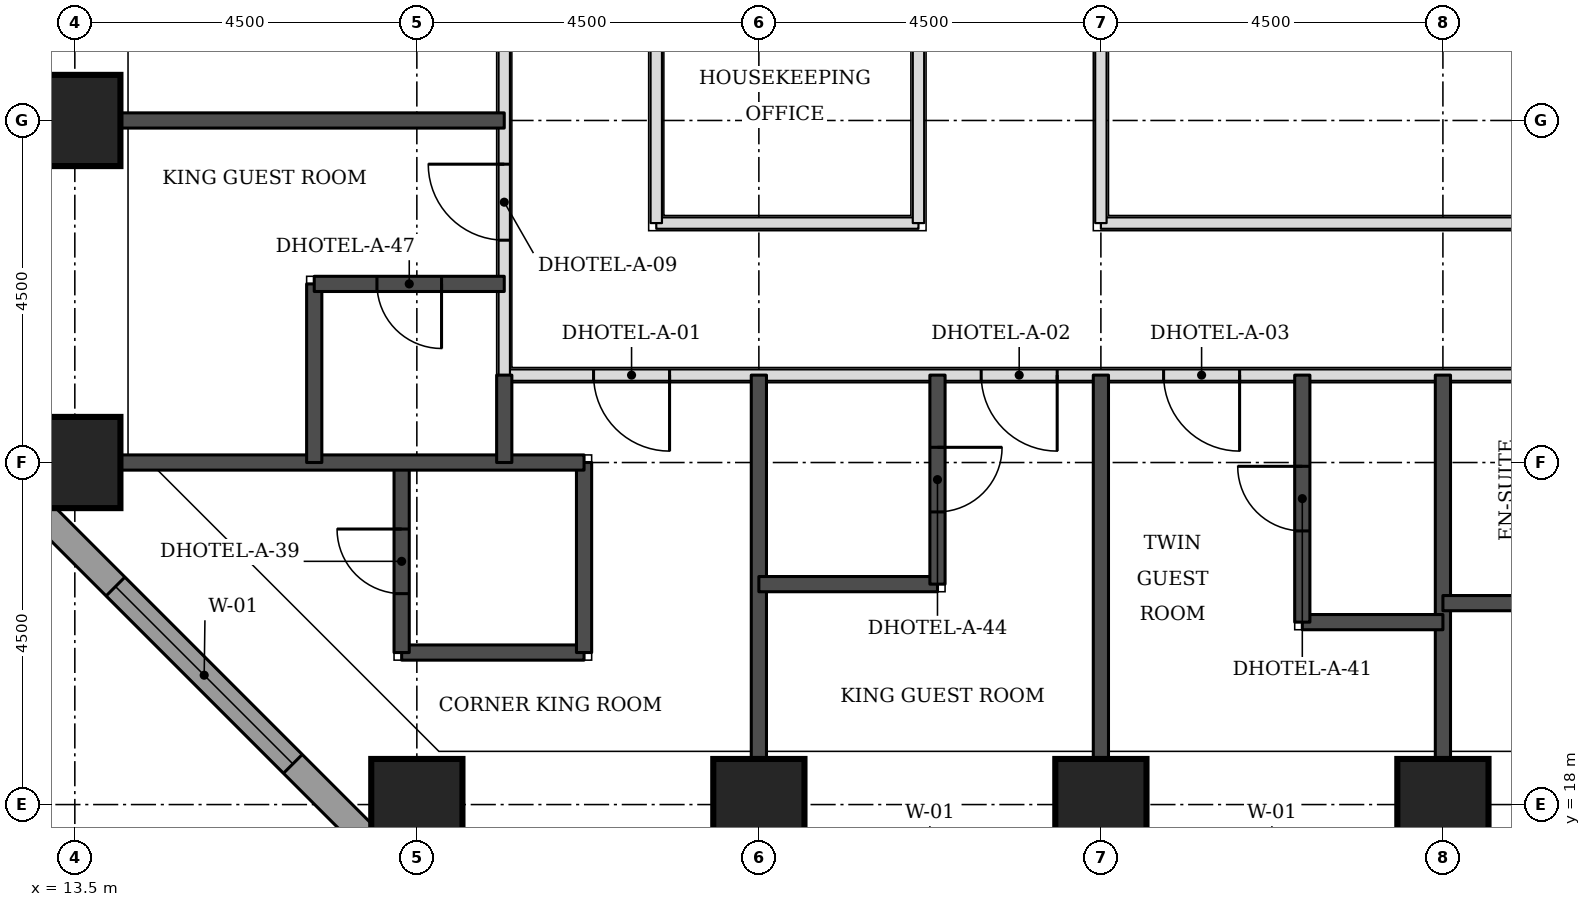
"""IFC4 building model, lengths in metres.
Left out: names, types, materials, properties, quantities, classifications, styles, units other than length and angle.
Written with IfcOpenShell. Run it as: python <this file> out.ifc"""

import sys

from ifc_helpers import new_model, si_unit, direction, frame, frame_2d, origin, origin_2d, place, context, subcontext, project, spatial, rectangle, extrude, element, fill, save


model = new_model("IFC4")
c1 = context("Model", 3, precision=1e-05, world=origin(), true_north=direction((0.0, 1.0)))
c2 = subcontext(c1, "Body", "Model", "MODEL_VIEW")
j1 = project(units=[si_unit("LENGTHUNIT", "METRE"), si_unit("PLANEANGLEUNIT", "RADIAN")], contexts=[c1])
p1 = place(None, origin())
s1 = spatial("IfcSite", under=j1, at=p1, CompositionType="ELEMENT")
p2 = place(p1, origin())
s2 = spatial("IfcBuilding", under=s1, at=p2, CompositionType="ELEMENT")
p3 = place(p2, frame((0.0, 0.0, 26.4)))
s3 = spatial("IfcBuildingStorey", under=s2, at=p3, CompositionType="ELEMENT", Elevation=26.4)
for number, where, z_axis, x_axis in (
    (1, (18.0, 18.0, 0.0), (0.0, 0.0, 1.0), (1.0, 0.0, 0.0)),
    (2, (22.5, 18.0, 0.0), (0.0, 0.0, 1.0), (1.0, 0.0, 0.0)),
    (3, (27.0, 18.0, 0.0), (0.0, 0.0, 1.0), (1.0, 0.0, 0.0)),
    (4, (31.5, 18.0, 0.0), (0.0, 0.0, 1.0), (1.0, 0.0, 0.0)),
    (5, (13.5, 22.5, 0.0), (0.0, 0.0, 1.0), (1.0, 0.0, 0.0)),
    (6, (13.5, 27.0, 0.0), (0.0, 0.0, 1.0), (1.0, 0.0, 0.0)),
):
    element("IfcColumn", number, at=place(p3, frame(where, z_axis=z_axis, x_axis=x_axis)), inside=s3, PredefinedType="COLUMN", context=c2, shape_type="SweptSolid", body=[
        extrude(rectangle(XDim=1.2, YDim=1.2, at=origin_2d()), origin(), (0.0, 0.0, 1.0), 3.3),
    ])
p4 = place(p3, frame((12.674, 22.23, 0.0), z_axis=(0.0, 0.0, 1.0), x_axis=(0.707106781187, -0.707106781187, 0.0)))
e7 = element("IfcWall", 7, at=p4, inside=s3, PredefinedType="STANDARD", context=c2, shape_type="SweptSolid", body=[
    extrude(rectangle(XDim=7.151, YDim=0.35, at=frame_2d((3.576, 0.0))), origin(), (0.0, 0.0, 1.0), 3.055),
])
p5 = place(p4, frame((1.926, 0.0, 0.8)))
e8 = element("IfcOpeningElement", 8, at=p5, cuts=e7, PredefinedType="OPENING", context=c2, shape_type="SweptSolid", body=[
    extrude(rectangle(XDim=3.3, YDim=1.5, at=frame_2d((1.65, 0.75))), frame((0.0, 0.185, 0.0), z_axis=(0.0, -1.0, 0.0), x_axis=(1.0, 0.0, 0.0)), (0.0, 0.0, 1.0), 0.37),
])
p6 = place(p3, frame((19.15, 23.65, 0.0), z_axis=(0.0, 0.0, 1.0), x_axis=(1.0, 0.0, 0.0)))
e9 = element("IfcWall", 9, at=p6, inside=s3, PredefinedType="PARTITIONING", context=c2, shape_type="SweptSolid", body=[
    extrude(rectangle(XDim=32.35, YDim=0.15, at=frame_2d((16.175, 0.0))), origin(), (0.0, 0.0, 1.0), 3.08),
])
p7 = place(p6, frame((6.275, 0.0, 0.0)))
e10 = element("IfcOpeningElement", 10, at=p7, cuts=e9, PredefinedType="OPENING", context=c2, shape_type="SweptSolid", body=[
    extrude(rectangle(XDim=1.0, YDim=2.1, at=frame_2d((0.5, 1.05))), frame((0.0, 0.085, 0.0), z_axis=(0.0, -1.0, 0.0), x_axis=(1.0, 0.0, 0.0)), (0.0, 0.0, 1.0), 0.17),
])
p8 = place(p6, frame((8.675, 0.0, 0.0)))
e11 = element("IfcOpeningElement", 11, at=p8, cuts=e9, PredefinedType="OPENING", context=c2, shape_type="SweptSolid", body=[
    extrude(rectangle(XDim=1.0, YDim=2.1, at=frame_2d((0.5, 1.05))), frame((0.0, 0.085, 0.0), z_axis=(0.0, -1.0, 0.0), x_axis=(1.0, 0.0, 0.0)), (0.0, 0.0, 1.0), 0.17),
])
p9 = place(p6, frame((15.25, 0.0, 0.0)))
e12 = element("IfcOpeningElement", 12, at=p9, cuts=e9, PredefinedType="OPENING", context=c2, shape_type="SweptSolid", body=[
    extrude(rectangle(XDim=1.0, YDim=2.1, at=frame_2d((0.5, 1.05))), frame((0.0, 0.085, 0.0), z_axis=(0.0, -1.0, 0.0), x_axis=(1.0, 0.0, 0.0)), (0.0, 0.0, 1.0), 0.17),
])
p10 = place(p6, frame((17.675, 0.0, 0.0)))
e13 = element("IfcOpeningElement", 13, at=p10, cuts=e9, PredefinedType="OPENING", context=c2, shape_type="SweptSolid", body=[
    extrude(rectangle(XDim=1.0, YDim=2.1, at=frame_2d((0.5, 1.05))), frame((0.0, 0.085, 0.0), z_axis=(0.0, -1.0, 0.0), x_axis=(1.0, 0.0, 0.0)), (0.0, 0.0, 1.0), 0.17),
])
p11 = place(p6, frame((24.275, 0.0, 0.0)))
e14 = element("IfcOpeningElement", 14, at=p11, cuts=e9, PredefinedType="OPENING", context=c2, shape_type="SweptSolid", body=[
    extrude(rectangle(XDim=1.0, YDim=2.1, at=frame_2d((0.5, 1.05))), frame((0.0, 0.085, 0.0), z_axis=(0.0, -1.0, 0.0), x_axis=(1.0, 0.0, 0.0)), (0.0, 0.0, 1.0), 0.17),
])
p12 = place(p6, frame((26.675, 0.0, 0.0)))
e15 = element("IfcOpeningElement", 15, at=p12, cuts=e9, PredefinedType="OPENING", context=c2, shape_type="SweptSolid", body=[
    extrude(rectangle(XDim=1.0, YDim=2.1, at=frame_2d((0.5, 1.05))), frame((0.0, 0.085, 0.0), z_axis=(0.0, -1.0, 0.0), x_axis=(1.0, 0.0, 0.0)), (0.0, 0.0, 1.0), 0.17),
])
p13 = place(p6, frame((1.175, 0.0, 0.0)))
e16 = element("IfcOpeningElement", 16, at=p13, cuts=e9, PredefinedType="OPENING", context=c2, shape_type="SweptSolid", body=[
    extrude(rectangle(XDim=1.0, YDim=2.1, at=frame_2d((0.5, 1.05))), frame((0.0, 0.085, 0.0), z_axis=(0.0, -1.0, 0.0), x_axis=(1.0, 0.0, 0.0)), (0.0, 0.0, 1.0), 0.17),
])
p14 = place(p6, frame((30.85, 0.0, 0.0)))
e17 = element("IfcOpeningElement", 17, at=p14, cuts=e9, PredefinedType="OPENING", context=c2, shape_type="SweptSolid", body=[
    extrude(rectangle(XDim=1.0, YDim=2.1, at=frame_2d((0.5, 1.05))), frame((0.0, 0.085, 0.0), z_axis=(0.0, -1.0, 0.0), x_axis=(1.0, 0.0, 0.0)), (0.0, 0.0, 1.0), 0.17),
])
p15 = place(p3, frame((19.15, 23.65, 0.0), z_axis=(0.0, 0.0, 1.0), x_axis=(0.0, 1.0, 0.0)))
e18 = element("IfcWall", 18, at=p15, inside=s3, PredefinedType="PARTITIONING", context=c2, shape_type="SweptSolid", body=[
    extrude(rectangle(XDim=25.85, YDim=0.15, at=frame_2d((12.925, 0.0))), origin(), (0.0, 0.0, 1.0), 3.08),
])
p16 = place(p15, frame((1.775, 0.0, 0.0)))
e19 = element("IfcOpeningElement", 19, at=p16, cuts=e18, PredefinedType="OPENING", context=c2, shape_type="SweptSolid", body=[
    extrude(rectangle(XDim=1.0, YDim=2.1, at=frame_2d((0.5, 1.05))), frame((0.0, 0.085, 0.0), z_axis=(0.0, -1.0, 0.0), x_axis=(1.0, 0.0, 0.0)), (0.0, 0.0, 1.0), 0.17),
])
p17 = place(p15, frame((6.125, 0.0, 0.0)))
e20 = element("IfcOpeningElement", 20, at=p17, cuts=e18, PredefinedType="OPENING", context=c2, shape_type="SweptSolid", body=[
    extrude(rectangle(XDim=1.0, YDim=2.1, at=frame_2d((0.5, 1.05))), frame((0.0, 0.085, 0.0), z_axis=(0.0, -1.0, 0.0), x_axis=(1.0, 0.0, 0.0)), (0.0, 0.0, 1.0), 0.17),
])
p18 = place(p15, frame((17.825, 0.0, 0.0)))
e21 = element("IfcOpeningElement", 21, at=p18, cuts=e18, PredefinedType="OPENING", context=c2, shape_type="SweptSolid", body=[
    extrude(rectangle(XDim=1.0, YDim=2.1, at=frame_2d((0.5, 1.05))), frame((0.0, 0.085, 0.0), z_axis=(0.0, -1.0, 0.0), x_axis=(1.0, 0.0, 0.0)), (0.0, 0.0, 1.0), 0.17),
])
p19 = place(p15, frame((23.04, 0.0, 0.0)))
e22 = element("IfcOpeningElement", 22, at=p19, cuts=e18, PredefinedType="OPENING", context=c2, shape_type="SweptSolid", body=[
    extrude(rectangle(XDim=0.9, YDim=2.1, at=frame_2d((0.45, 1.05))), frame((0.0, 0.085, 0.0), z_axis=(0.0, -1.0, 0.0), x_axis=(1.0, 0.0, 0.0)), (0.0, 0.0, 1.0), 0.17),
])
p20 = place(p3, frame((21.15, 25.65, 0.0), z_axis=(0.0, 0.0, 1.0), x_axis=(1.0, 0.0, 0.0)))
e23 = element("IfcWall", 23, at=p20, inside=s3, PredefinedType="PARTITIONING", context=c2, shape_type="SweptSolid", body=[
    extrude(rectangle(XDim=3.45, YDim=0.15, at=frame_2d((1.725, 0.0))), origin(), (0.0, 0.0, 1.0), 3.08),
])
p21 = place(p3, frame((21.15, 25.65, 0.0), z_axis=(0.0, 0.0, 1.0), x_axis=(0.0, 1.0, 0.0)))
e24 = element("IfcWall", 24, at=p21, inside=s3, PredefinedType="PARTITIONING", context=c2, shape_type="SweptSolid", body=[
    extrude(rectangle(XDim=17.35, YDim=0.15, at=frame_2d((8.675, 0.0))), origin(), (0.0, 0.0, 1.0), 3.08),
])
p22 = place(p21, frame((3.3, 0.0, 0.0)))
e25 = element("IfcOpeningElement", 25, at=p22, cuts=e24, PredefinedType="OPENING", context=c2, shape_type="SweptSolid", body=[
    extrude(rectangle(XDim=0.9, YDim=2.1, at=frame_2d((0.45, 1.05))), frame((0.0, 0.085, 0.0), z_axis=(0.0, -1.0, 0.0), x_axis=(1.0, 0.0, 0.0)), (0.0, 0.0, 1.0), 0.17),
])
p23 = place(p21, frame((10.725, 0.0, 0.0)))
e26 = element("IfcOpeningElement", 26, at=p23, cuts=e24, PredefinedType="OPENING", context=c2, shape_type="SweptSolid", body=[
    extrude(rectangle(XDim=0.9, YDim=2.1, at=frame_2d((0.45, 1.05))), frame((0.0, 0.085, 0.0), z_axis=(0.0, -1.0, 0.0), x_axis=(1.0, 0.0, 0.0)), (0.0, 0.0, 1.0), 0.17),
])
p24 = place(p3, frame((24.6, 25.65, 0.0), z_axis=(0.0, 0.0, 1.0), x_axis=(0.0, 1.0, 0.0)))
e27 = element("IfcWall", 27, at=p24, inside=s3, PredefinedType="PARTITIONING", context=c2, shape_type="SweptSolid", body=[
    extrude(rectangle(XDim=14.85, YDim=0.15, at=frame_2d((7.425, 0.0))), origin(), (0.0, 0.0, 1.0), 3.08),
])
p25 = place(p3, frame((27.0, 25.65, 0.0), z_axis=(0.0, 0.0, 1.0), x_axis=(1.0, 0.0, 0.0)))
e28 = element("IfcWall", 28, at=p25, inside=s3, PredefinedType="PARTITIONING", context=c2, shape_type="SweptSolid", body=[
    extrude(rectangle(XDim=11.5, YDim=0.15, at=frame_2d((5.75, 0.0))), origin(), (0.0, 0.0, 1.0), 3.08),
])
p26 = place(p3, frame((27.0, 25.65, 0.0), z_axis=(0.0, 0.0, 1.0), x_axis=(0.0, 1.0, 0.0)))
e29 = element("IfcWall", 29, at=p26, inside=s3, PredefinedType="PARTITIONING", context=c2, shape_type="SweptSolid", body=[
    extrude(rectangle(XDim=3.85, YDim=0.15, at=frame_2d((1.925, 0.0))), origin(), (0.0, 0.0, 1.0), 3.08),
])
for number, where, z_axis, x_axis in (
    (30, (22.5, 18.6, 0.0), (0.0, 0.0, 1.0), (0.0, 1.0, 0.0)),
    (31, (27.0, 18.6, 0.0), (0.0, 0.0, 1.0), (0.0, 1.0, 0.0)),
    (32, (31.5, 18.6, 0.0), (0.0, 0.0, 1.0), (0.0, 1.0, 0.0)),
):
    element("IfcWall", number, at=place(p3, frame(where, z_axis=z_axis, x_axis=x_axis)), inside=s3, PredefinedType="SOLIDWALL", context=c2, shape_type="SweptSolid", body=[
        extrude(rectangle(XDim=5.05, YDim=0.2, at=frame_2d((2.525, 0.0))), origin(), (0.0, 0.0, 1.0), 3.08),
    ])
p27 = place(p3, frame((17.8, 20.0, 0.0), z_axis=(0.0, 0.0, 1.0), x_axis=(1.0, 0.0, 0.0)))
e33 = element("IfcWall", 33, at=p27, inside=s3, PredefinedType="SOLIDWALL", context=c2, shape_type="SweptSolid", body=[
    extrude(rectangle(XDim=2.4, YDim=0.2, at=frame_2d((1.2, 0.0))), origin(), (0.0, 0.0, 1.0), 3.08),
])
p28 = place(p3, frame((17.8, 20.0, 0.0), z_axis=(0.0, 0.0, 1.0), x_axis=(0.0, 1.0, 0.0)))
e34 = element("IfcWall", 34, at=p28, inside=s3, PredefinedType="SOLIDWALL", context=c2, shape_type="SweptSolid", body=[
    extrude(rectangle(XDim=2.5, YDim=0.2, at=frame_2d((1.25, 0.0))), origin(), (0.0, 0.0, 1.0), 3.08),
])
p29 = place(p28, frame((0.775, 0.0, 0.0)))
e35 = element("IfcOpeningElement", 35, at=p29, cuts=e34, PredefinedType="OPENING", context=c2, shape_type="SweptSolid", body=[
    extrude(rectangle(XDim=0.85, YDim=2.1, at=frame_2d((0.425, 1.05))), frame((0.0, 0.11, 0.0), z_axis=(0.0, -1.0, 0.0), x_axis=(1.0, 0.0, 0.0)), (0.0, 0.0, 1.0), 0.22),
])
p30 = place(p3, frame((20.2, 20.0, 0.0), z_axis=(0.0, 0.0, 1.0), x_axis=(0.0, 1.0, 0.0)))
e36 = element("IfcWall", 36, at=p30, inside=s3, PredefinedType="SOLIDWALL", context=c2, shape_type="SweptSolid", body=[
    extrude(rectangle(XDim=2.5, YDim=0.2, at=frame_2d((1.25, 0.0))), origin(), (0.0, 0.0, 1.0), 3.08),
])
p31 = place(p3, frame((29.65, 20.4, 0.0), z_axis=(0.0, 0.0, 1.0), x_axis=(1.0, 0.0, 0.0)))
e37 = element("IfcWall", 37, at=p31, inside=s3, PredefinedType="SOLIDWALL", context=c2, shape_type="SweptSolid", body=[
    extrude(rectangle(XDim=1.85, YDim=0.2, at=frame_2d((0.925, 0.0))), origin(), (0.0, 0.0, 1.0), 3.08),
])
p32 = place(p3, frame((29.65, 20.4, 0.0), z_axis=(0.0, 0.0, 1.0), x_axis=(0.0, 1.0, 0.0)))
e38 = element("IfcWall", 38, at=p32, inside=s3, PredefinedType="SOLIDWALL", context=c2, shape_type="SweptSolid", body=[
    extrude(rectangle(XDim=3.25, YDim=0.2, at=frame_2d((1.625, 0.0))), origin(), (0.0, 0.0, 1.0), 3.08),
])
p33 = place(p32, frame((1.2, 0.0, 0.0)))
e39 = element("IfcOpeningElement", 39, at=p33, cuts=e38, PredefinedType="OPENING", context=c2, shape_type="SweptSolid", body=[
    extrude(rectangle(XDim=0.85, YDim=2.1, at=frame_2d((0.425, 1.05))), frame((0.0, 0.11, 0.0), z_axis=(0.0, -1.0, 0.0), x_axis=(1.0, 0.0, 0.0)), (0.0, 0.0, 1.0), 0.22),
])
for number, where, z_axis, x_axis in (
    (40, (31.5, 20.65, 0.0), (0.0, 0.0, 1.0), (1.0, 0.0, 0.0)),
    (41, (22.5, 20.9, 0.0), (0.0, 0.0, 1.0), (1.0, 0.0, 0.0)),
):
    element("IfcWall", number, at=place(p3, frame(where, z_axis=z_axis, x_axis=x_axis)), inside=s3, PredefinedType="SOLIDWALL", context=c2, shape_type="SweptSolid", body=[
        extrude(rectangle(XDim=2.35, YDim=0.2, at=frame_2d((1.175, 0.0))), origin(), (0.0, 0.0, 1.0), 3.08),
    ])
p34 = place(p3, frame((24.85, 20.9, 0.0), z_axis=(0.0, 0.0, 1.0), x_axis=(0.0, 1.0, 0.0)))
e42 = element("IfcWall", 42, at=p34, inside=s3, PredefinedType="SOLIDWALL", context=c2, shape_type="SweptSolid", body=[
    extrude(rectangle(XDim=2.75, YDim=0.2, at=frame_2d((1.375, 0.0))), origin(), (0.0, 0.0, 1.0), 3.08),
])
p35 = place(p34, frame((0.95, 0.0, 0.0)))
e43 = element("IfcOpeningElement", 43, at=p35, cuts=e42, PredefinedType="OPENING", context=c2, shape_type="SweptSolid", body=[
    extrude(rectangle(XDim=0.85, YDim=2.1, at=frame_2d((0.425, 1.05))), frame((0.0, 0.11, 0.0), z_axis=(0.0, -1.0, 0.0), x_axis=(1.0, 0.0, 0.0)), (0.0, 0.0, 1.0), 0.22),
])
p36 = place(p3, frame((14.1, 22.5, 0.0), z_axis=(0.0, 0.0, 1.0), x_axis=(1.0, 0.0, 0.0)))
e44 = element("IfcWall", 44, at=p36, inside=s3, PredefinedType="SOLIDWALL", context=c2, shape_type="SweptSolid", body=[
    extrude(rectangle(XDim=6.1, YDim=0.2, at=frame_2d((3.05, 0.0))), origin(), (0.0, 0.0, 1.0), 3.08),
])
p37 = place(p3, frame((16.65, 22.5, 0.0), z_axis=(0.0, 0.0, 1.0), x_axis=(0.0, 1.0, 0.0)))
e45 = element("IfcWall", 45, at=p37, inside=s3, PredefinedType="SOLIDWALL", context=c2, shape_type="SweptSolid", body=[
    extrude(rectangle(XDim=2.35, YDim=0.2, at=frame_2d((1.175, 0.0))), origin(), (0.0, 0.0, 1.0), 3.08),
])
p38 = place(p3, frame((19.15, 22.5, 0.0), z_axis=(0.0, 0.0, 1.0), x_axis=(0.0, 1.0, 0.0)))
e46 = element("IfcWall", 46, at=p38, inside=s3, PredefinedType="SOLIDWALL", context=c2, shape_type="SweptSolid", body=[
    extrude(rectangle(XDim=1.15, YDim=0.2, at=frame_2d((0.575, 0.0))), origin(), (0.0, 0.0, 1.0), 3.08),
])
p39 = place(p3, frame((16.65, 24.85, 0.0), z_axis=(0.0, 0.0, 1.0), x_axis=(1.0, 0.0, 0.0)))
e47 = element("IfcWall", 47, at=p39, inside=s3, PredefinedType="SOLIDWALL", context=c2, shape_type="SweptSolid", body=[
    extrude(rectangle(XDim=2.5, YDim=0.2, at=frame_2d((1.25, 0.0))), origin(), (0.0, 0.0, 1.0), 3.08),
])
p40 = place(p39, frame((0.825, 0.0, 0.0)))
e48 = element("IfcOpeningElement", 48, at=p40, cuts=e47, PredefinedType="OPENING", context=c2, shape_type="SweptSolid", body=[
    extrude(rectangle(XDim=0.85, YDim=2.1, at=frame_2d((0.425, 1.05))), frame((0.0, 0.11, 0.0), z_axis=(0.0, -1.0, 0.0), x_axis=(1.0, 0.0, 0.0)), (0.0, 0.0, 1.0), 0.22),
])
p41 = place(p3, frame((14.1, 27.0, 0.0), z_axis=(0.0, 0.0, 1.0), x_axis=(1.0, 0.0, 0.0)))
e49 = element("IfcWall", 49, at=p41, inside=s3, PredefinedType="SOLIDWALL", context=c2, shape_type="SweptSolid", body=[
    extrude(rectangle(XDim=5.05, YDim=0.2, at=frame_2d((2.525, 0.0))), origin(), (0.0, 0.0, 1.0), 3.08),
])
p42 = place(p5, origin())
e50 = element("IfcWindow", 50, at=p42, inside=s3, PartitioningType="SINGLE_PANEL", PredefinedType="WINDOW", context=c2, shape_type="SweptSolid", body=[
    extrude(rectangle(XDim=3.3, YDim=1.5, at=frame_2d((1.65, 0.75))), frame((0.0, 0.085, 0.0), z_axis=(0.0, -1.0, 0.0), x_axis=(1.0, 0.0, 0.0)), (0.0, 0.0, 1.0), 0.06),
])
fill(e8, e50)
p43 = place(p7, frame((1.0, 0.0, 0.0), z_axis=(0.0, 0.0, 1.0), x_axis=(-1.0, 0.0, 0.0)))
e51 = element("IfcDoor", 51, at=p43, inside=s3, OperationType="SINGLE_SWING_LEFT", PredefinedType="DOOR", context=c2, shape_type="SweptSolid", body=[
    extrude(rectangle(XDim=1.0, YDim=2.1, at=frame_2d((0.5, 1.05))), frame((0.0, 0.025, 0.0), z_axis=(0.0, -1.0, 0.0), x_axis=(1.0, 0.0, 0.0)), (0.0, 0.0, 1.0), 0.05),
])
fill(e10, e51)
p44 = place(p35, frame((0.85, 0.0, 0.0), z_axis=(0.0, 0.0, 1.0), x_axis=(-1.0, 0.0, 0.0)))
e52 = element("IfcDoor", 52, at=p44, inside=s3, OperationType="SINGLE_SWING_LEFT", PredefinedType="DOOR", context=c2, shape_type="SweptSolid", body=[
    extrude(rectangle(XDim=0.85, YDim=2.1, at=frame_2d((0.425, 1.05))), frame((0.0, 0.025, 0.0), z_axis=(0.0, -1.0, 0.0), x_axis=(1.0, 0.0, 0.0)), (0.0, 0.0, 1.0), 0.05),
])
fill(e43, e52)
p45 = place(p8, frame((1.0, 0.0, 0.0), z_axis=(0.0, 0.0, 1.0), x_axis=(-1.0, 0.0, 0.0)))
e53 = element("IfcDoor", 53, at=p45, inside=s3, OperationType="SINGLE_SWING_LEFT", PredefinedType="DOOR", context=c2, shape_type="SweptSolid", body=[
    extrude(rectangle(XDim=1.0, YDim=2.1, at=frame_2d((0.5, 1.05))), frame((0.0, 0.025, 0.0), z_axis=(0.0, -1.0, 0.0), x_axis=(1.0, 0.0, 0.0)), (0.0, 0.0, 1.0), 0.05),
])
fill(e11, e53)
p46 = place(p33, origin())
e54 = element("IfcDoor", 54, at=p46, inside=s3, OperationType="SINGLE_SWING_RIGHT", PredefinedType="DOOR", context=c2, shape_type="SweptSolid", body=[
    extrude(rectangle(XDim=0.85, YDim=2.1, at=frame_2d((0.425, 1.05))), frame((0.0, 0.025, 0.0), z_axis=(0.0, -1.0, 0.0), x_axis=(1.0, 0.0, 0.0)), (0.0, 0.0, 1.0), 0.05),
])
fill(e39, e54)
p47 = place(p16, origin())
e55 = element("IfcDoor", 55, at=p47, inside=s3, OperationType="SINGLE_SWING_RIGHT", PredefinedType="DOOR", context=c2, shape_type="SweptSolid", body=[
    extrude(rectangle(XDim=1.0, YDim=2.1, at=frame_2d((0.5, 1.05))), frame((0.0, 0.025, 0.0), z_axis=(0.0, -1.0, 0.0), x_axis=(1.0, 0.0, 0.0)), (0.0, 0.0, 1.0), 0.05),
])
fill(e19, e55)
p48 = place(p40, frame((0.85, 0.0, 0.0), z_axis=(0.0, 0.0, 1.0), x_axis=(-1.0, 0.0, 0.0)))
e56 = element("IfcDoor", 56, at=p48, inside=s3, OperationType="SINGLE_SWING_LEFT", PredefinedType="DOOR", context=c2, shape_type="SweptSolid", body=[
    extrude(rectangle(XDim=0.85, YDim=2.1, at=frame_2d((0.425, 1.05))), frame((0.0, 0.025, 0.0), z_axis=(0.0, -1.0, 0.0), x_axis=(1.0, 0.0, 0.0)), (0.0, 0.0, 1.0), 0.05),
])
fill(e48, e56)
p49 = place(p13, frame((1.0, 0.0, 0.0), z_axis=(0.0, 0.0, 1.0), x_axis=(-1.0, 0.0, 0.0)))
e57 = element("IfcDoor", 57, at=p49, inside=s3, OperationType="SINGLE_SWING_LEFT", PredefinedType="DOOR", context=c2, shape_type="SweptSolid", body=[
    extrude(rectangle(XDim=1.0, YDim=2.1, at=frame_2d((0.5, 1.05))), frame((0.0, 0.025, 0.0), z_axis=(0.0, -1.0, 0.0), x_axis=(1.0, 0.0, 0.0)), (0.0, 0.0, 1.0), 0.05),
])
fill(e16, e57)
p50 = place(p29, origin())
e58 = element("IfcDoor", 58, at=p50, inside=s3, OperationType="SINGLE_SWING_RIGHT", PredefinedType="DOOR", context=c2, shape_type="SweptSolid", body=[
    extrude(rectangle(XDim=0.85, YDim=2.1, at=frame_2d((0.425, 1.05))), frame((0.0, 0.025, 0.0), z_axis=(0.0, -1.0, 0.0), x_axis=(1.0, 0.0, 0.0)), (0.0, 0.0, 1.0), 0.05),
])
fill(e35, e58)
save(model, sys.argv[1])
